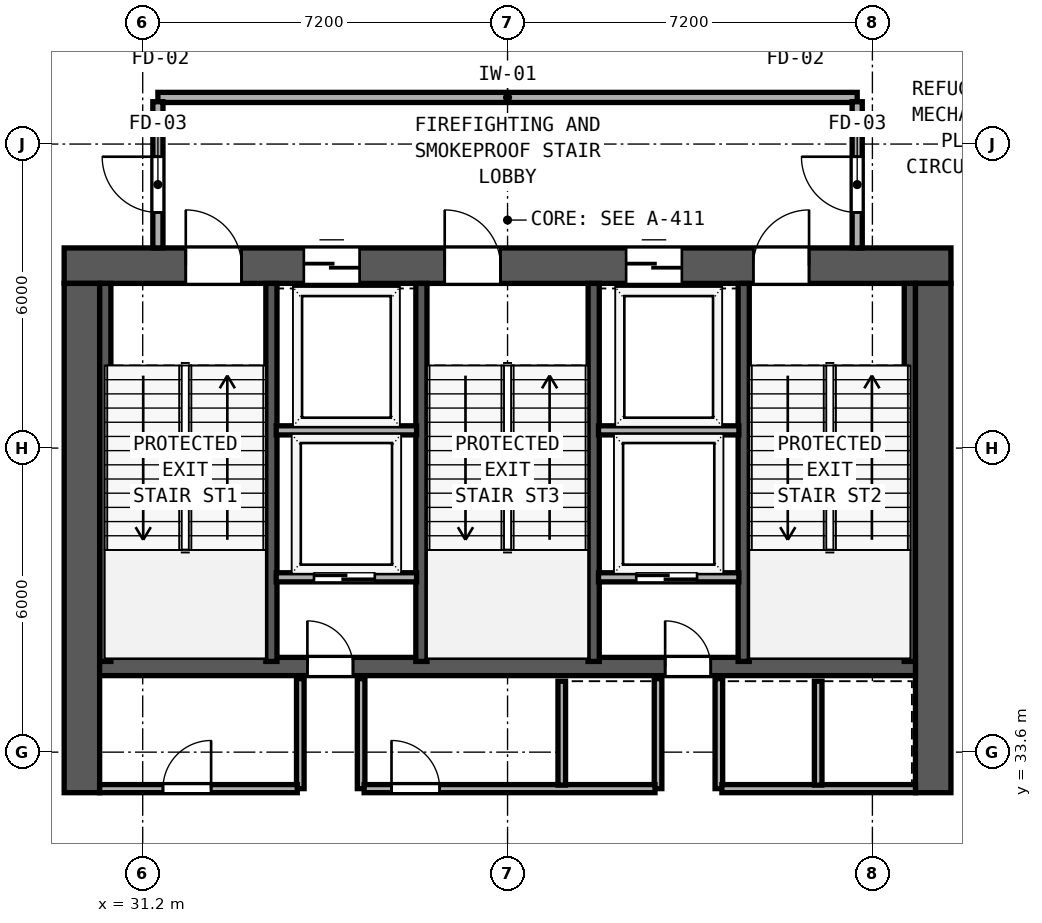
"""IFC4 building model, lengths in metres.
Left out: names, types, materials, properties, quantities, classifications, styles, units other than length and angle.
Written with IfcOpenShell. Run it as: python <this file> out.ifc"""

import sys

from ifc_helpers import new_model, si_unit, direction, frame, frame_2d, origin, place, context, subcontext, project, spatial, rectangle, extrude, element, fill, save


model = new_model("IFC4")
c1 = context("Model", 3, precision=1e-05, world=origin(), true_north=direction((0.0, 1.0)))
c2 = subcontext(c1, "Body", "Model", "MODEL_VIEW")
j1 = project(units=[si_unit("LENGTHUNIT", "METRE"), si_unit("PLANEANGLEUNIT", "RADIAN")], contexts=[c1])
p1 = place(None, origin())
s1 = spatial("IfcSite", under=j1, at=p1, CompositionType="ELEMENT")
p2 = place(p1, origin())
s2 = spatial("IfcBuilding", under=s1, at=p2, CompositionType="ELEMENT")
p3 = place(p2, frame((0.0, 0.0, 160.0)))
s3 = spatial("IfcBuildingStorey", under=s2, at=p3, CompositionType="ELEMENT", Elevation=160.0)
p4 = place(p3, frame((29.65, 43.2, 0.0), z_axis=(0.0, 0.0, 1.0), x_axis=(1.0, 0.0, 0.0)))
e1 = element("IfcWall", 1, at=p4, inside=s3, PredefinedType="SHEAR", context=c2, shape_type="SweptSolid", body=[
    extrude(rectangle(XDim=17.5, YDim=0.7, at=frame_2d((8.75, 0.0))), origin(), (0.0, 0.0, 1.0), 4.35),
])
p5 = place(p4, frame((2.4, 0.0, 0.0)))
e2 = element("IfcOpeningElement", 2, at=p5, cuts=e1, PredefinedType="OPENING", context=c2, shape_type="SweptSolid", body=[
    extrude(rectangle(XDim=1.1, YDim=2.15, at=frame_2d((0.55, 1.075))), frame((0.0, 0.36, 0.0), z_axis=(0.0, -1.0, 0.0), x_axis=(1.0, 0.0, 0.0)), (0.0, 0.0, 1.0), 0.72),
])
p6 = place(p4, frame((7.51, 0.0, 0.0)))
e3 = element("IfcOpeningElement", 3, at=p6, cuts=e1, PredefinedType="OPENING", context=c2, shape_type="SweptSolid", body=[
    extrude(rectangle(XDim=1.1, YDim=2.15, at=frame_2d((0.55, 1.075))), frame((0.0, 0.36, 0.0), z_axis=(0.0, -1.0, 0.0), x_axis=(1.0, 0.0, 0.0)), (0.0, 0.0, 1.0), 0.72),
])
p7 = place(p4, frame((13.6, 0.0, 0.0)))
e4 = element("IfcOpeningElement", 4, at=p7, cuts=e1, PredefinedType="OPENING", context=c2, shape_type="SweptSolid", body=[
    extrude(rectangle(XDim=1.1, YDim=2.15, at=frame_2d((0.55, 1.075))), frame((0.0, 0.36, 0.0), z_axis=(0.0, -1.0, 0.0), x_axis=(1.0, 0.0, 0.0)), (0.0, 0.0, 1.0), 0.72),
])
p8 = place(p4, frame((4.73, 0.0, 0.0)))
e5 = element("IfcOpeningElement", 5, at=p8, cuts=e1, PredefinedType="OPENING", context=c2, shape_type="SweptSolid", body=[
    extrude(rectangle(XDim=1.1, YDim=2.2, at=frame_2d((0.55, 1.1))), frame((0.0, 0.36, 0.0), z_axis=(0.0, -1.0, 0.0), x_axis=(1.0, 0.0, 0.0)), (0.0, 0.0, 1.0), 0.72),
])
p9 = place(p4, frame((11.09, 0.0, 0.0)))
e6 = element("IfcOpeningElement", 6, at=p9, cuts=e1, PredefinedType="OPENING", context=c2, shape_type="SweptSolid", body=[
    extrude(rectangle(XDim=1.1, YDim=2.2, at=frame_2d((0.55, 1.1))), frame((0.0, 0.36, 0.0), z_axis=(0.0, -1.0, 0.0), x_axis=(1.0, 0.0, 0.0)), (0.0, 0.0, 1.0), 0.72),
])
for number, where, z_axis, x_axis in (
    (7, (30.0, 32.8, 0.0), (0.0, 0.0, 1.0), (0.0, 1.0, 0.0)),
    (8, (46.8, 32.8, 0.0), (0.0, 0.0, 1.0), (0.0, 1.0, 0.0)),
):
    element("IfcWall", number, at=place(p3, frame(where, z_axis=z_axis, x_axis=x_axis)), inside=s3, PredefinedType="SHEAR", context=c2, shape_type="SweptSolid", body=[
        extrude(rectangle(XDim=10.05, YDim=0.7, at=frame_2d((5.025, 0.0))), origin(), (0.0, 0.0, 1.0), 4.35),
    ])
p10 = place(p3, frame((30.35, 35.29, 0.0), z_axis=(0.0, 0.0, 1.0), x_axis=(1.0, 0.0, 0.0)))
e9 = element("IfcWall", 9, at=p10, inside=s3, PredefinedType="SHEAR", context=c2, shape_type="SweptSolid", body=[
    extrude(rectangle(XDim=16.1, YDim=0.36, at=frame_2d((8.05, 0.0))), origin(), (0.0, 0.0, 1.0), 4.35),
])
p11 = place(p10, frame((5.0, 0.0, 0.0), z_axis=(0.0, 0.0, 1.0), x_axis=(-1.0, 0.0, 0.0)))
e10 = element("IfcOpeningElement", 10, at=p11, cuts=e9, PredefinedType="OPENING", context=c2, shape_type="SweptSolid", body=[
    extrude(rectangle(XDim=0.9, YDim=2.1, at=frame_2d((0.45, 1.05))), frame((0.0, 0.19, 0.0), z_axis=(0.0, -1.0, 0.0), x_axis=(1.0, 0.0, 0.0)), (0.0, 0.0, 1.0), 0.38),
])
p12 = place(p10, frame((12.06, 0.0, 0.0), z_axis=(0.0, 0.0, 1.0), x_axis=(-1.0, 0.0, 0.0)))
e11 = element("IfcOpeningElement", 11, at=p12, cuts=e9, PredefinedType="OPENING", context=c2, shape_type="SweptSolid", body=[
    extrude(rectangle(XDim=0.9, YDim=2.1, at=frame_2d((0.45, 1.05))), frame((0.0, 0.19, 0.0), z_axis=(0.0, -1.0, 0.0), x_axis=(1.0, 0.0, 0.0)), (0.0, 0.0, 1.0), 0.38),
])
for number, where, z_axis, x_axis in (
    (12, (30.462, 35.39, 0.0), (0.0, 0.0, 1.0), (0.0, 1.0, 0.0)),
    (13, (33.74, 35.39, 0.0), (0.0, 0.0, 1.0), (0.0, 1.0, 0.0)),
    (14, (36.7, 35.39, 0.0), (0.0, 0.0, 1.0), (0.0, 1.0, 0.0)),
    (15, (40.1, 35.39, 0.0), (0.0, 0.0, 1.0), (0.0, 1.0, 0.0)),
    (16, (43.06, 35.39, 0.0), (0.0, 0.0, 1.0), (0.0, 1.0, 0.0)),
    (17, (46.338, 35.39, 0.0), (0.0, 0.0, 1.0), (0.0, 1.0, 0.0)),
):
    element("IfcWall", number, at=place(p3, frame(where, z_axis=z_axis, x_axis=x_axis)), inside=s3, PredefinedType="SHEAR", context=c2, shape_type="SweptSolid", body=[
        extrude(rectangle(XDim=7.46, YDim=0.22, at=frame_2d((3.73, 0.0))), origin(), (0.0, 0.0, 1.0), 4.35),
    ])
p13 = place(p3, frame((31.5, 46.52, 0.0), z_axis=(0.0, 0.0, 1.0), x_axis=(1.0, 0.0, 0.0)))
e18 = element("IfcWall", 18, at=p13, inside=s3, PredefinedType="SOLIDWALL", context=c2, shape_type="SweptSolid", body=[
    extrude(rectangle(XDim=13.8, YDim=0.2, at=frame_2d((6.9, 0.0))), origin(), (0.0, 0.0, 1.0), 4.35),
])
p14 = place(p3, frame((31.5, 43.55, 0.0), z_axis=(0.0, 0.0, 1.0), x_axis=(0.0, 1.0, 0.0)))
e19 = element("IfcWall", 19, at=p14, inside=s3, PredefinedType="SOLIDWALL", context=c2, shape_type="SweptSolid", body=[
    extrude(rectangle(XDim=2.885, YDim=0.2, at=frame_2d((1.442, 0.0))), origin(), (0.0, 0.0, 1.0), 4.35),
])
p15 = place(p14, frame((1.8, 0.0, 0.0), z_axis=(0.0, 0.0, 1.0), x_axis=(-1.0, 0.0, 0.0)))
e20 = element("IfcOpeningElement", 20, at=p15, cuts=e19, PredefinedType="OPENING", context=c2, shape_type="SweptSolid", body=[
    extrude(rectangle(XDim=1.1, YDim=2.15, at=frame_2d((0.55, 1.075))), frame((0.0, 0.11, 0.0), z_axis=(0.0, -1.0, 0.0), x_axis=(1.0, 0.0, 0.0)), (0.0, 0.0, 1.0), 0.22),
])
p16 = place(p3, frame((45.3, 43.55, 0.0), z_axis=(0.0, 0.0, 1.0), x_axis=(0.0, 1.0, 0.0)))
e21 = element("IfcWall", 21, at=p16, inside=s3, PredefinedType="SOLIDWALL", context=c2, shape_type="SweptSolid", body=[
    extrude(rectangle(XDim=2.885, YDim=0.2, at=frame_2d((1.442, 0.0))), origin(), (0.0, 0.0, 1.0), 4.35),
])
p17 = place(p16, frame((0.7, 0.0, 0.0)))
e22 = element("IfcOpeningElement", 22, at=p17, cuts=e21, PredefinedType="OPENING", context=c2, shape_type="SweptSolid", body=[
    extrude(rectangle(XDim=1.1, YDim=2.15, at=frame_2d((0.55, 1.075))), frame((0.0, 0.11, 0.0), z_axis=(0.0, -1.0, 0.0), x_axis=(1.0, 0.0, 0.0)), (0.0, 0.0, 1.0), 0.22),
])
for number, where, z_axis, x_axis in (
    (23, (33.835, 39.95, 0.0), (0.0, 0.0, 1.0), (1.0, 0.0, 0.0)),
    (24, (40.195, 39.95, 0.0), (0.0, 0.0, 1.0), (1.0, 0.0, 0.0)),
):
    element("IfcWall", number, at=place(p3, frame(where, z_axis=z_axis, x_axis=x_axis)), inside=s3, PredefinedType="SOLIDWALL", context=c2, shape_type="SweptSolid", body=[
        extrude(rectangle(XDim=2.77, YDim=0.18, at=frame_2d((1.385, 0.0))), origin(), (0.0, 0.0, 1.0), 4.35),
    ])
p18 = place(p3, frame((33.835, 37.05, 0.0), z_axis=(0.0, 0.0, 1.0), x_axis=(1.0, 0.0, 0.0)))
e25 = element("IfcWall", 25, at=p18, inside=s3, PredefinedType="SOLIDWALL", context=c2, shape_type="SweptSolid", body=[
    extrude(rectangle(XDim=2.77, YDim=0.18, at=frame_2d((1.385, 0.0))), origin(), (0.0, 0.0, 1.0), 4.35),
])
p19 = place(p18, frame((1.945, 0.0, 0.0), z_axis=(0.0, 0.0, 1.0), x_axis=(-1.0, 0.0, 0.0)))
e26 = element("IfcOpeningElement", 26, at=p19, cuts=e25, PredefinedType="OPENING", context=c2, shape_type="SweptSolid", body=[
    extrude(rectangle(XDim=1.2, YDim=2.2, at=frame_2d((0.6, 1.1))), frame((0.0, 0.1, 0.0), z_axis=(0.0, -1.0, 0.0), x_axis=(1.0, 0.0, 0.0)), (0.0, 0.0, 1.0), 0.2),
])
for number, where, z_axis, x_axis in (
    (27, (34.31, 32.88, 0.0), (0.0, 0.0, 1.0), (0.0, 1.0, 0.0)),
    (28, (35.51, 32.88, 0.0), (0.0, 0.0, 1.0), (0.0, 1.0, 0.0)),
):
    element("IfcWall", number, at=place(p3, frame(where, z_axis=z_axis, x_axis=x_axis)), inside=s3, PredefinedType="SOLIDWALL", context=c2, shape_type="SweptSolid", body=[
        extrude(rectangle(XDim=2.17, YDim=0.15, at=frame_2d((1.085, 0.0))), origin(), (0.0, 0.0, 1.0), 4.35),
    ])
p20 = place(p3, frame((40.195, 37.05, 0.0), z_axis=(0.0, 0.0, 1.0), x_axis=(1.0, 0.0, 0.0)))
e29 = element("IfcWall", 29, at=p20, inside=s3, PredefinedType="SOLIDWALL", context=c2, shape_type="SweptSolid", body=[
    extrude(rectangle(XDim=2.77, YDim=0.18, at=frame_2d((1.385, 0.0))), origin(), (0.0, 0.0, 1.0), 4.35),
])
p21 = place(p20, frame((1.945, 0.0, 0.0), z_axis=(0.0, 0.0, 1.0), x_axis=(-1.0, 0.0, 0.0)))
e30 = element("IfcOpeningElement", 30, at=p21, cuts=e29, PredefinedType="OPENING", context=c2, shape_type="SweptSolid", body=[
    extrude(rectangle(XDim=1.2, YDim=2.2, at=frame_2d((0.6, 1.1))), frame((0.0, 0.1, 0.0), z_axis=(0.0, -1.0, 0.0), x_axis=(1.0, 0.0, 0.0)), (0.0, 0.0, 1.0), 0.2),
])
for number, where, z_axis, x_axis in (
    (31, (41.37, 32.88, 0.0), (0.0, 0.0, 1.0), (0.0, 1.0, 0.0)),
    (32, (42.57, 32.88, 0.0), (0.0, 0.0, 1.0), (0.0, 1.0, 0.0)),
):
    element("IfcWall", number, at=place(p3, frame(where, z_axis=z_axis, x_axis=x_axis)), inside=s3, PredefinedType="SOLIDWALL", context=c2, shape_type="SweptSolid", body=[
        extrude(rectangle(XDim=2.17, YDim=0.15, at=frame_2d((1.085, 0.0))), origin(), (0.0, 0.0, 1.0), 4.35),
    ])
p22 = place(p3, frame((30.35, 32.88, 0.0), z_axis=(0.0, 0.0, 1.0), x_axis=(1.0, 0.0, 0.0)))
e33 = element("IfcWall", 33, at=p22, inside=s3, PredefinedType="SOLIDWALL", context=c2, shape_type="SweptSolid", body=[
    extrude(rectangle(XDim=3.9, YDim=0.16, at=frame_2d((1.95, 0.0))), origin(), (0.0, 0.0, 1.0), 4.35),
])
p23 = place(p22, frame((2.2, 0.0, 0.0), z_axis=(0.0, 0.0, 1.0), x_axis=(-1.0, 0.0, 0.0)))
e34 = element("IfcOpeningElement", 34, at=p23, cuts=e33, PredefinedType="OPENING", context=c2, shape_type="SweptSolid", body=[
    extrude(rectangle(XDim=0.95, YDim=2.12, at=frame_2d((0.475, 1.06))), frame((0.0, 0.09, 0.0), z_axis=(0.0, -1.0, 0.0), x_axis=(1.0, 0.0, 0.0)), (0.0, 0.0, 1.0), 0.18),
])
p24 = place(p3, frame((35.57, 32.88, 0.0), z_axis=(0.0, 0.0, 1.0), x_axis=(1.0, 0.0, 0.0)))
e35 = element("IfcWall", 35, at=p24, inside=s3, PredefinedType="SOLIDWALL", context=c2, shape_type="SweptSolid", body=[
    extrude(rectangle(XDim=5.74, YDim=0.16, at=frame_2d((2.87, 0.0))), origin(), (0.0, 0.0, 1.0), 4.35),
])
p25 = place(p24, frame((1.49, 0.0, 0.0), z_axis=(0.0, 0.0, 1.0), x_axis=(-1.0, 0.0, 0.0)))
e36 = element("IfcOpeningElement", 36, at=p25, cuts=e35, PredefinedType="OPENING", context=c2, shape_type="SweptSolid", body=[
    extrude(rectangle(XDim=0.95, YDim=2.12, at=frame_2d((0.475, 1.06))), frame((0.0, 0.09, 0.0), z_axis=(0.0, -1.0, 0.0), x_axis=(1.0, 0.0, 0.0)), (0.0, 0.0, 1.0), 0.18),
])
p26 = place(p3, frame((42.63, 32.88, 0.0), z_axis=(0.0, 0.0, 1.0), x_axis=(1.0, 0.0, 0.0)))
e37 = element("IfcWall", 37, at=p26, inside=s3, PredefinedType="SOLIDWALL", context=c2, shape_type="SweptSolid", body=[
    extrude(rectangle(XDim=3.82, YDim=0.16, at=frame_2d((1.91, 0.0))), origin(), (0.0, 0.0, 1.0), 4.35),
])
for number, where, z_axis, x_axis in (
    (38, (39.47, 32.95, 0.0), (0.0, 0.0, 1.0), (0.0, 1.0, 0.0)),
    (39, (44.53, 32.95, 0.0), (0.0, 0.0, 1.0), (0.0, 1.0, 0.0)),
):
    element("IfcWall", number, at=place(p3, frame(where, z_axis=z_axis, x_axis=x_axis)), inside=s3, PredefinedType="SOLIDWALL", context=c2, shape_type="SweptSolid", body=[
        extrude(rectangle(XDim=2.05, YDim=0.15, at=frame_2d((1.025, 0.0))), origin(), (0.0, 0.0, 1.0), 4.35),
    ])
p27 = place(p5, origin())
e40 = element("IfcDoor", 40, at=p27, inside=s3, OperationType="SINGLE_SWING_LEFT", PredefinedType="DOOR", context=c2, shape_type="SweptSolid", body=[
    extrude(rectangle(XDim=1.1, YDim=2.15, at=frame_2d((0.55, 1.075))), frame((0.0, 0.185, 0.0), z_axis=(0.0, -1.0, 0.0), x_axis=(1.0, 0.0, 0.0)), (0.0, 0.0, 1.0), 0.05),
])
fill(e2, e40)
p28 = place(p6, origin())
e41 = element("IfcDoor", 41, at=p28, inside=s3, OperationType="SINGLE_SWING_LEFT", PredefinedType="DOOR", context=c2, shape_type="SweptSolid", body=[
    extrude(rectangle(XDim=1.1, YDim=2.15, at=frame_2d((0.55, 1.075))), frame((0.0, 0.185, 0.0), z_axis=(0.0, -1.0, 0.0), x_axis=(1.0, 0.0, 0.0)), (0.0, 0.0, 1.0), 0.05),
])
fill(e3, e41)
p29 = place(p7, origin())
e42 = element("IfcDoor", 42, at=p29, inside=s3, OperationType="SINGLE_SWING_RIGHT", PredefinedType="DOOR", context=c2, shape_type="SweptSolid", body=[
    extrude(rectangle(XDim=1.1, YDim=2.15, at=frame_2d((0.55, 1.075))), frame((0.0, 0.185, 0.0), z_axis=(0.0, -1.0, 0.0), x_axis=(1.0, 0.0, 0.0)), (0.0, 0.0, 1.0), 0.05),
])
fill(e4, e42)
p30 = place(p15, origin())
e43 = element("IfcDoor", 43, at=p30, inside=s3, OperationType="SINGLE_SWING_LEFT", PredefinedType="DOOR", context=c2, shape_type="SweptSolid", body=[
    extrude(rectangle(XDim=1.1, YDim=2.15, at=frame_2d((0.55, 1.075))), frame((0.0, 0.025, 0.0), z_axis=(0.0, -1.0, 0.0), x_axis=(1.0, 0.0, 0.0)), (0.0, 0.0, 1.0), 0.05),
])
fill(e20, e43)
p31 = place(p17, origin())
e44 = element("IfcDoor", 44, at=p31, inside=s3, OperationType="SINGLE_SWING_RIGHT", PredefinedType="DOOR", context=c2, shape_type="SweptSolid", body=[
    extrude(rectangle(XDim=1.1, YDim=2.15, at=frame_2d((0.55, 1.075))), frame((0.0, 0.025, 0.0), z_axis=(0.0, -1.0, 0.0), x_axis=(1.0, 0.0, 0.0)), (0.0, 0.0, 1.0), 0.05),
])
fill(e22, e44)
p32 = place(p8, origin())
e45 = element("IfcDoor", 45, at=p32, inside=s3, OperationType="SLIDING_TO_LEFT", PredefinedType="DOOR", context=c2, shape_type="SweptSolid", body=[
    extrude(rectangle(XDim=1.1, YDim=2.2, at=frame_2d((0.55, 1.1))), frame((0.0, 0.185, 0.0), z_axis=(0.0, -1.0, 0.0), x_axis=(1.0, 0.0, 0.0)), (0.0, 0.0, 1.0), 0.05),
])
fill(e5, e45)
p33 = place(p9, origin())
e46 = element("IfcDoor", 46, at=p33, inside=s3, OperationType="SLIDING_TO_LEFT", PredefinedType="DOOR", context=c2, shape_type="SweptSolid", body=[
    extrude(rectangle(XDim=1.1, YDim=2.2, at=frame_2d((0.55, 1.1))), frame((0.0, 0.185, 0.0), z_axis=(0.0, -1.0, 0.0), x_axis=(1.0, 0.0, 0.0)), (0.0, 0.0, 1.0), 0.05),
])
fill(e6, e46)
p34 = place(p19, origin())
e47 = element("IfcDoor", 47, at=p34, inside=s3, OperationType="SLIDING_TO_RIGHT", PredefinedType="DOOR", context=c2, shape_type="SweptSolid", body=[
    extrude(rectangle(XDim=1.2, YDim=2.2, at=frame_2d((0.6, 1.1))), frame((0.0, 0.025, 0.0), z_axis=(0.0, -1.0, 0.0), x_axis=(1.0, 0.0, 0.0)), (0.0, 0.0, 1.0), 0.05),
])
fill(e26, e47)
p35 = place(p11, origin())
e48 = element("IfcDoor", 48, at=p35, inside=s3, OperationType="SINGLE_SWING_RIGHT", PredefinedType="DOOR", context=c2, shape_type="SweptSolid", body=[
    extrude(rectangle(XDim=0.9, YDim=2.1, at=frame_2d((0.45, 1.05))), frame((0.0, 0.025, 0.0), z_axis=(0.0, -1.0, 0.0), x_axis=(1.0, 0.0, 0.0)), (0.0, 0.0, 1.0), 0.05),
])
fill(e10, e48)
p36 = place(p21, origin())
e49 = element("IfcDoor", 49, at=p36, inside=s3, OperationType="SLIDING_TO_RIGHT", PredefinedType="DOOR", context=c2, shape_type="SweptSolid", body=[
    extrude(rectangle(XDim=1.2, YDim=2.2, at=frame_2d((0.6, 1.1))), frame((0.0, 0.025, 0.0), z_axis=(0.0, -1.0, 0.0), x_axis=(1.0, 0.0, 0.0)), (0.0, 0.0, 1.0), 0.05),
])
fill(e30, e49)
p37 = place(p12, origin())
e50 = element("IfcDoor", 50, at=p37, inside=s3, OperationType="SINGLE_SWING_RIGHT", PredefinedType="DOOR", context=c2, shape_type="SweptSolid", body=[
    extrude(rectangle(XDim=0.9, YDim=2.1, at=frame_2d((0.45, 1.05))), frame((0.0, 0.025, 0.0), z_axis=(0.0, -1.0, 0.0), x_axis=(1.0, 0.0, 0.0)), (0.0, 0.0, 1.0), 0.05),
])
fill(e11, e50)
p38 = place(p23, origin())
e51 = element("IfcDoor", 51, at=p38, inside=s3, OperationType="SINGLE_SWING_LEFT", PredefinedType="DOOR", context=c2, shape_type="SweptSolid", body=[
    extrude(rectangle(XDim=0.95, YDim=2.12, at=frame_2d((0.475, 1.06))), frame((0.0, 0.025, 0.0), z_axis=(0.0, -1.0, 0.0), x_axis=(1.0, 0.0, 0.0)), (0.0, 0.0, 1.0), 0.05),
])
fill(e34, e51)
p39 = place(p25, origin())
e52 = element("IfcDoor", 52, at=p39, inside=s3, OperationType="SINGLE_SWING_RIGHT", PredefinedType="DOOR", context=c2, shape_type="SweptSolid", body=[
    extrude(rectangle(XDim=0.95, YDim=2.12, at=frame_2d((0.475, 1.06))), frame((0.0, 0.025, 0.0), z_axis=(0.0, -1.0, 0.0), x_axis=(1.0, 0.0, 0.0)), (0.0, 0.0, 1.0), 0.05),
])
fill(e36, e52)
save(model, sys.argv[1])
